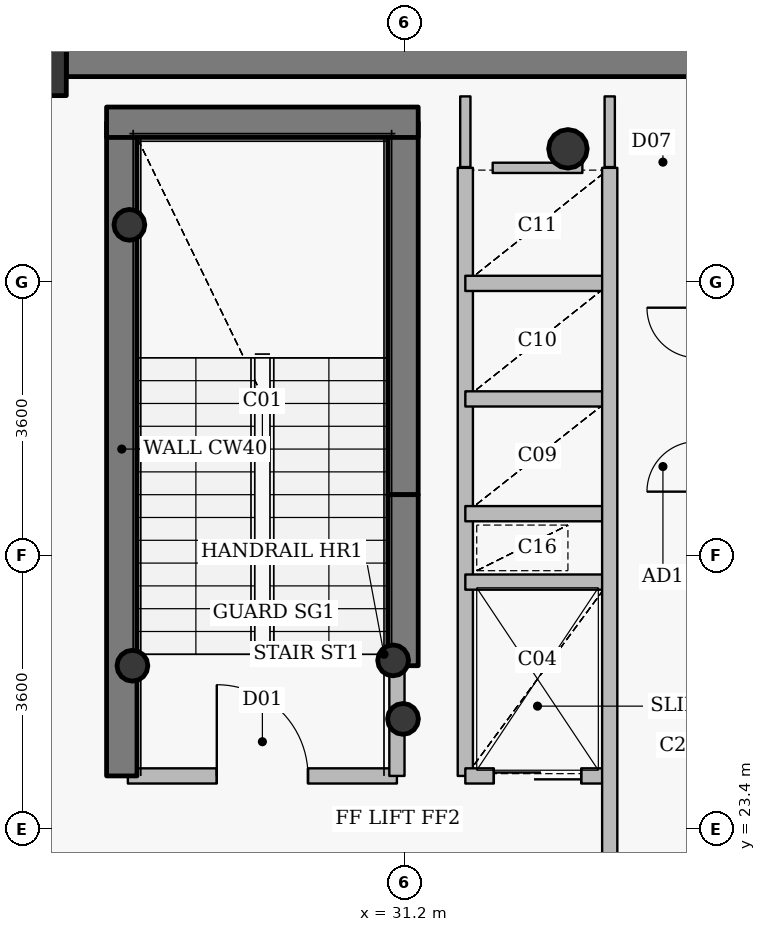
"""IFC4 building model, lengths in metres.
Left out: names, types, materials, properties, quantities, classifications, styles, units other than length and angle.
Written with IfcOpenShell. Run it as: python <this file> out.ifc"""

import sys

from ifc_helpers import new_model, si_unit, direction, frame, frame_2d, origin, origin_2d, place, context, subcontext, project, spatial, rectangle, hollow_circle, extrude, source, transform, mapped, element, fill, save


model = new_model("IFC4")
c1 = context("Model", 3, precision=1e-05, world=origin(), true_north=direction((0.0, 1.0)))
c2 = subcontext(c1, "Body", "Model", "MODEL_VIEW")
j1 = project(units=[si_unit("LENGTHUNIT", "METRE"), si_unit("PLANEANGLEUNIT", "RADIAN")], contexts=[c1])
p1 = place(None, origin())
s1 = spatial("IfcSite", under=j1, at=p1, CompositionType="ELEMENT")
p2 = place(p1, origin())
s2 = spatial("IfcBuilding", under=s1, at=p2, CompositionType="ELEMENT")
p3 = place(p2, frame((0.0, 0.0, 32.4)))
s3 = spatial("IfcBuildingStorey", under=s2, at=p3, CompositionType="ELEMENT", Elevation=32.4)
p4 = place(p3, frame((26.05, 33.75, 0.0), z_axis=(0.0, 0.0, 1.0), x_axis=(1.0, 0.0, 0.0)))
e1 = element("IfcColumn", 1, at=p4, inside=s3, PredefinedType="COLUMN", context=c2, shape_type="SweptSolid", body=[
    extrude(rectangle(XDim=1.4, YDim=1.4, at=origin_2d()), origin(), (0.0, 0.0, 1.0), 4.2),
])
p5 = place(p3, frame((33.35, 32.35, 0.0), z_axis=(0.0, 0.0, 1.0), x_axis=(1.0, 0.0, 0.0)))
e2 = element("IfcColumn", 2, at=p5, inside=s3, PredefinedType="COLUMN", context=c2, shape_type="SweptSolid", body=[
    extrude(hollow_circle(Radius=0.254, WallThickness=0.02, at=origin_2d()), origin(), (0.0, 0.0, 1.0), 4.2),
])
p6 = place(p3, frame((27.48, 24.1, 0.0), z_axis=(0.0, 0.0, 1.0), x_axis=(0.0, 1.0, 0.0)))
e3 = element("IfcWall", 3, at=p6, inside=s3, PredefinedType="SHEAR", context=c2, shape_type="SweptSolid", body=[
    extrude(rectangle(XDim=8.6, YDim=0.4, at=frame_2d((4.3, 0.0))), origin(), (0.0, 0.0, 1.0), 4.2),
])
p7 = place(p3, frame((31.18, 27.8, 0.0), z_axis=(0.0, 0.0, 1.0), x_axis=(0.0, 1.0, 0.0)))
e4 = element("IfcWall", 4, at=p7, inside=s3, PredefinedType="SHEAR", context=c2, shape_type="SweptSolid", body=[
    extrude(rectangle(XDim=4.9, YDim=0.4, at=frame_2d((2.45, 0.0))), origin(), (0.0, 0.0, 1.0), 4.2),
])
p8 = place(p3, frame((27.28, 32.7, 0.0), z_axis=(0.0, 0.0, 1.0), x_axis=(1.0, 0.0, 0.0)))
e5 = element("IfcWall", 5, at=p8, inside=s3, PredefinedType="SHEAR", context=c2, shape_type="SweptSolid", body=[
    extrude(rectangle(XDim=4.1, YDim=0.4, at=frame_2d((2.05, 0.0))), origin(), (0.0, 0.0, 1.0), 4.2),
])
for number, where, z_axis, x_axis in (
    (6, (27.58, 31.35, 0.0), (0.0, 0.0, 1.0), (1.0, 0.0, 0.0)),
    (7, (31.05, 25.62, 0.0), (0.0, 0.0, 1.0), (1.0, 0.0, 0.0)),
    (8, (31.18, 24.85, 0.0), (0.0, 0.0, 1.0), (1.0, 0.0, 0.0)),
    (9, (27.62, 25.55, 0.0), (0.0, 0.0, 1.0), (1.0, 0.0, 0.0)),
):
    element("IfcColumn", number, at=place(p3, frame(where, z_axis=z_axis, x_axis=x_axis)), inside=s3, PredefinedType="COLUMN", context=c2, shape_type="SweptSolid", body=[
        extrude(hollow_circle(Radius=0.203, WallThickness=0.016, at=origin_2d()), origin(), (0.0, 0.0, 1.0), 4.2),
    ])
p9 = place(p3, frame((26.75, 33.75, 0.0), z_axis=(0.0, 0.0, 1.0), x_axis=(1.0, 0.0, 0.0)))
e10 = element("IfcWall", 10, at=p9, inside=s3, PredefinedType="SHEAR", context=c2, shape_type="SweptSolid", body=[
    extrude(rectangle(XDim=18.5, YDim=0.9, at=frame_2d((9.25, 0.0))), origin(), (0.0, 0.0, 1.0), 3.4),
])
p10 = place(p3, frame((31.18, 25.55, 0.0), z_axis=(0.0, 0.0, 1.0), x_axis=(0.0, 1.0, 0.0)))
e11 = element("IfcWall", 11, at=p10, inside=s3, PredefinedType="SHEAR", context=c2, shape_type="SweptSolid", body=[
    extrude(rectangle(XDim=2.25, YDim=0.4, at=frame_2d((1.125, 0.0))), origin(), (0.0, 0.0, 1.0), 3.55),
])
p11 = place(p3, frame((27.56, 24.1, 0.0), z_axis=(0.0, 0.0, 1.0), x_axis=(1.0, 0.0, 0.0)))
e12 = element("IfcWall", 12, at=p11, inside=s3, PredefinedType="PARTITIONING", context=c2, shape_type="SweptSolid", body=[
    extrude(rectangle(XDim=3.54, YDim=0.2, at=frame_2d((1.77, 0.0))), origin(), (0.0, 0.0, 1.0), 3.95),
])
p12 = place(p11, frame((1.17, 0.0, 0.0)))
e13 = element("IfcOpeningElement", 13, at=p12, cuts=e12, PredefinedType="OPENING", context=c2, shape_type="SweptSolid", body=[
    extrude(rectangle(XDim=1.2, YDim=2.15, at=origin_2d()), frame((0.6, 0.11, 1.075), z_axis=(0.0, -1.0, 0.0), x_axis=(1.0, 0.0, 0.0)), (0.0, 0.0, 1.0), 0.22),
])
p13 = place(p3, frame((31.1, 24.1, 0.0), z_axis=(0.0, 0.0, 1.0), x_axis=(0.0, 1.0, 0.0)))
e14 = element("IfcWall", 14, at=p13, inside=s3, PredefinedType="PARTITIONING", context=c2, shape_type="SweptSolid", body=[
    extrude(rectangle(XDim=1.44, YDim=0.2, at=frame_2d((0.72, 0.0))), origin(), (0.0, 0.0, 1.0), 3.95),
])
p14 = place(p3, frame((32.0, 24.1, 0.0), z_axis=(0.0, 0.0, 1.0), x_axis=(0.0, 1.0, 0.0)))
e15 = element("IfcWall", 15, at=p14, inside=s3, PredefinedType="PARTITIONING", context=c2, shape_type="SweptSolid", body=[
    extrude(rectangle(XDim=8.0, YDim=0.2, at=frame_2d((4.0, 0.0))), origin(), (0.0, 0.0, 1.0), 3.95),
])
p15 = place(p3, frame((32.0, 24.1, 0.0), z_axis=(0.0, 0.0, 1.0), x_axis=(1.0, 0.0, 0.0)))
e16 = element("IfcWall", 16, at=p15, inside=s3, PredefinedType="PARTITIONING", context=c2, shape_type="SweptSolid", body=[
    extrude(rectangle(XDim=1.9, YDim=0.2, at=frame_2d((0.95, 0.0))), origin(), (0.0, 0.0, 1.0), 3.535),
])
p16 = place(p15, frame((0.375, 0.0, 0.0)))
e17 = element("IfcOpeningElement", 17, at=p16, cuts=e16, PredefinedType="OPENING", context=c2, shape_type="SweptSolid", body=[
    extrude(rectangle(XDim=1.15, YDim=2.15, at=origin_2d()), frame((0.575, 0.11, 1.075), z_axis=(0.0, -1.0, 0.0), x_axis=(1.0, 0.0, 0.0)), (0.0, 0.0, 1.0), 0.22),
])
for number, where, z_axis, x_axis in (
    (18, (32.0, 26.65, 0.0), (0.0, 0.0, 1.0), (1.0, 0.0, 0.0)),
    (19, (32.0, 27.55, 0.0), (0.0, 0.0, 1.0), (1.0, 0.0, 0.0)),
    (20, (32.0, 29.06, 0.0), (0.0, 0.0, 1.0), (1.0, 0.0, 0.0)),
    (21, (32.0, 30.58, 0.0), (0.0, 0.0, 1.0), (1.0, 0.0, 0.0)),
):
    element("IfcWall", number, at=place(p3, frame(where, z_axis=z_axis, x_axis=x_axis)), inside=s3, PredefinedType="PARTITIONING", context=c2, shape_type="SweptSolid", body=[
        extrude(rectangle(XDim=1.9, YDim=0.2, at=frame_2d((0.95, 0.0))), origin(), (0.0, 0.0, 1.0), 3.535),
    ])
p17 = place(p3, frame((33.9, 20.7, 0.0), z_axis=(0.0, 0.0, 1.0), x_axis=(0.0, 1.0, 0.0)))
e22 = element("IfcWall", 22, at=p17, inside=s3, PredefinedType="PARTITIONING", context=c2, shape_type="SweptSolid", body=[
    extrude(rectangle(XDim=11.4, YDim=0.2, at=frame_2d((5.7, 0.0))), origin(), (0.0, 0.0, 1.0), 3.535),
])
p18 = place(p3, frame((32.36, 32.1, 0.0), z_axis=(0.0, 0.0, 1.0), x_axis=(1.0, 0.0, 0.0)))
e23 = element("IfcWall", 23, at=p18, inside=s3, PredefinedType="PARTITIONING", context=c2, shape_type="SweptSolid", body=[
    extrude(rectangle(XDim=1.18, YDim=0.135, at=frame_2d((0.59, 0.0))), origin(), (0.0, 0.0, 1.0), 3.535),
])
p19 = place(p3, frame((32.0, 33.04, 0.0), z_axis=(0.0, 0.0, 1.0), x_axis=(0.0, -1.0, 0.0)))
e24 = element("IfcWall", 24, at=p19, inside=s3, PredefinedType="PARTITIONING", context=c2, shape_type="SweptSolid", body=[
    extrude(rectangle(XDim=0.93, YDim=0.135, at=frame_2d((0.465, 0.0))), origin(), (0.0, 0.0, 1.0), 3.485),
])
p20 = place(p3, frame((33.9, 32.11, 0.0), z_axis=(0.0, 0.0, 1.0), x_axis=(0.0, 1.0, 0.0)))
e25 = element("IfcWall", 25, at=p20, inside=s3, PredefinedType="PARTITIONING", context=c2, shape_type="SweptSolid", body=[
    extrude(rectangle(XDim=0.93, YDim=0.135, at=frame_2d((0.465, 0.0))), origin(), (0.0, 0.0, 1.0), 3.535),
])
m1 = source(origin(), c2, "Body", "SweptSolid", [
    extrude(rectangle(XDim=1.2, YDim=2.15, at=origin_2d()), frame((0.6, 0.025, 1.075), z_axis=(0.0, -1.0, 0.0), x_axis=(1.0, 0.0, 0.0)), (0.0, 0.0, 1.0), 0.05),
])
p21 = place(p12, origin())
e26 = element("IfcDoor", 26, at=p21, inside=s3, OperationType="SINGLE_SWING_LEFT", PredefinedType="DOOR", context=c2, shape_type="MappedRepresentation", body=[
    mapped(m1, transform((0.0, 0.0, 0.0), x_axis=(1.0, 0.0, 0.0), y_axis=(0.0, 1.0, 0.0), z_axis=(0.0, 0.0, 1.0), scale=1.0)),
])
fill(e13, e26)
m2 = source(origin(), c2, "Body", "SweptSolid", [
    extrude(rectangle(XDim=1.15, YDim=2.15, at=origin_2d()), frame((0.575, 0.025, 1.075), z_axis=(0.0, -1.0, 0.0), x_axis=(1.0, 0.0, 0.0)), (0.0, 0.0, 1.0), 0.05),
])
p22 = place(p16, origin())
e27 = element("IfcDoor", 27, at=p22, inside=s3, OperationType="DOUBLE_DOOR_SLIDING", PredefinedType="USERDEFINED", context=c2, shape_type="MappedRepresentation", body=[
    mapped(m2, transform((0.0, 0.0, 0.0), x_axis=(1.0, 0.0, 0.0), y_axis=(0.0, 1.0, 0.0), z_axis=(0.0, 0.0, 1.0), scale=1.0)),
])
fill(e17, e27)
save(model, sys.argv[1])
